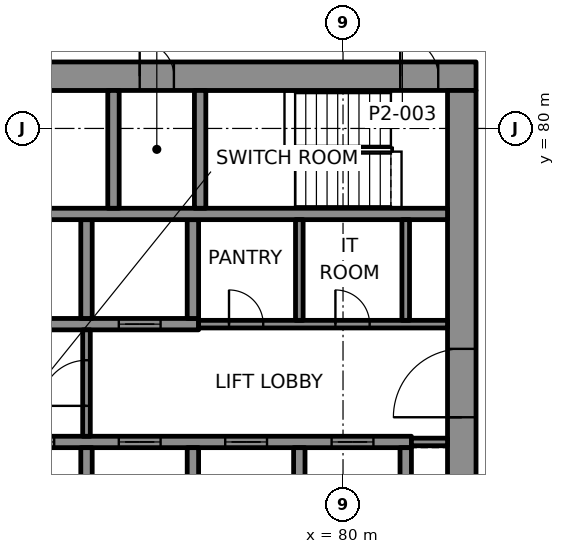
"""IFC4 building model, lengths in metres.
Left out: names, types, materials, properties, quantities, classifications, styles, units other than length and angle.
Written with IfcOpenShell. Run it as: python <this file> out.ifc"""

import sys

from ifc_helpers import new_model, si_unit, direction, frame, frame_2d, origin, place, context, subcontext, project, spatial, rectangle, extrude, element, fill, save


model = new_model("IFC4")
c1 = context("Model", 3, precision=1e-05, world=origin(), true_north=direction((0.0, 1.0)))
c2 = subcontext(c1, "Body", "Model", "MODEL_VIEW")
j1 = project(units=[si_unit("LENGTHUNIT", "METRE"), si_unit("PLANEANGLEUNIT", "RADIAN")], contexts=[c1])
p1 = place(None, origin())
s1 = spatial("IfcSite", under=j1, at=p1, CompositionType="ELEMENT")
p2 = place(p1, origin())
s2 = spatial("IfcBuilding", under=s1, at=p2, CompositionType="ELEMENT")
p3 = place(p2, frame((0.0, 0.0, 302.1)))
s3 = spatial("IfcBuildingStorey", under=s2, at=p3, CompositionType="ELEMENT", Elevation=302.1)
p4 = place(p3, frame((66.5, 81.375, 0.0), z_axis=(0.0, 0.0, 1.0), x_axis=(1.0, 0.0, 0.0)))
e1 = element("IfcWall", 1, at=p4, inside=s3, PredefinedType="SHEAR", context=c2, shape_type="SweptSolid", body=[
    extrude(rectangle(XDim=17.0, YDim=0.75, at=frame_2d((8.5, 0.0))), origin(), (0.0, 0.0, 1.0), 3.3),
])
p5 = place(p4, frame((1.195, 0.0, 0.0)))
e2 = element("IfcOpeningElement", 2, at=p5, cuts=e1, PredefinedType="OPENING", context=c2, shape_type="SweptSolid", body=[
    extrude(rectangle(XDim=1.0, YDim=2.1, at=frame_2d((0.5, 1.05))), frame((0.0, 0.385, 0.0), z_axis=(0.0, -1.0, 0.0), x_axis=(1.0, 0.0, 0.0)), (0.0, 0.0, 1.0), 0.77),
])
p6 = place(p4, frame((15.005, 0.0, 0.0)))
e3 = element("IfcOpeningElement", 3, at=p6, cuts=e1, PredefinedType="OPENING", context=c2, shape_type="SweptSolid", body=[
    extrude(rectangle(XDim=1.0, YDim=2.1, at=frame_2d((0.5, 1.05))), frame((0.0, 0.385, 0.0), z_axis=(0.0, -1.0, 0.0), x_axis=(1.0, 0.0, 0.0)), (0.0, 0.0, 1.0), 0.77),
])
p7 = place(p4, frame((8.15, 0.0, 0.0)))
e4 = element("IfcOpeningElement", 4, at=p7, cuts=e1, PredefinedType="OPENING", context=c2, shape_type="SweptSolid", body=[
    extrude(rectangle(XDim=0.9, YDim=2.1, at=frame_2d((0.45, 1.05))), frame((0.0, 0.385, 0.0), z_axis=(0.0, -1.0, 0.0), x_axis=(1.0, 0.0, 0.0)), (0.0, 0.0, 1.0), 0.77),
])
p8 = place(p3, frame((83.125, 69.0, 0.0), z_axis=(0.0, 0.0, 1.0), x_axis=(0.0, 1.0, 0.0)))
e5 = element("IfcWall", 5, at=p8, inside=s3, PredefinedType="SHEAR", context=c2, shape_type="SweptSolid", body=[
    extrude(rectangle(XDim=12.0, YDim=0.75, at=frame_2d((6.0, 0.0))), origin(), (0.0, 0.0, 1.0), 3.3),
])
p9 = place(p8, frame((3.4, 0.0, 0.0)))
e6 = element("IfcOpeningElement", 6, at=p9, cuts=e5, PredefinedType="OPENING", context=c2, shape_type="SweptSolid", body=[
    extrude(rectangle(XDim=1.8, YDim=2.1, at=frame_2d((0.9, 1.05))), frame((0.0, 0.385, 0.0), z_axis=(0.0, -1.0, 0.0), x_axis=(1.0, 0.0, 0.0)), (0.0, 0.0, 1.0), 0.77),
])
p10 = place(p3, frame((70.3, 71.75, 0.0), z_axis=(0.0, 0.0, 1.0), x_axis=(1.0, 0.0, 0.0)))
e7 = element("IfcWall", 7, at=p10, inside=s3, PredefinedType="SHEAR", context=c2, shape_type="SweptSolid", body=[
    extrude(rectangle(XDim=11.5, YDim=0.3, at=frame_2d((5.75, 0.0))), origin(), (0.0, 0.0, 1.0), 3.3),
])
p11 = place(p10, frame((1.0, 0.0, 0.0)))
e8 = element("IfcOpeningElement", 8, at=p11, cuts=e7, PredefinedType="OPENING", context=c2, shape_type="SweptSolid", body=[
    extrude(rectangle(XDim=1.1, YDim=2.1, at=frame_2d((0.55, 1.05))), frame((0.0, 0.16, 0.0), z_axis=(0.0, -1.0, 0.0), x_axis=(1.0, 0.0, 0.0)), (0.0, 0.0, 1.0), 0.32),
])
p12 = place(p10, frame((3.8, 0.0, 0.0)))
e9 = element("IfcOpeningElement", 9, at=p12, cuts=e7, PredefinedType="OPENING", context=c2, shape_type="SweptSolid", body=[
    extrude(rectangle(XDim=1.1, YDim=2.1, at=frame_2d((0.55, 1.05))), frame((0.0, 0.16, 0.0), z_axis=(0.0, -1.0, 0.0), x_axis=(1.0, 0.0, 0.0)), (0.0, 0.0, 1.0), 0.32),
])
p13 = place(p10, frame((6.6, 0.0, 0.0)))
e10 = element("IfcOpeningElement", 10, at=p13, cuts=e7, PredefinedType="OPENING", context=c2, shape_type="SweptSolid", body=[
    extrude(rectangle(XDim=1.1, YDim=2.1, at=frame_2d((0.55, 1.05))), frame((0.0, 0.16, 0.0), z_axis=(0.0, -1.0, 0.0), x_axis=(1.0, 0.0, 0.0)), (0.0, 0.0, 1.0), 0.32),
])
p14 = place(p10, frame((9.4, 0.0, 0.0)))
e11 = element("IfcOpeningElement", 11, at=p14, cuts=e7, PredefinedType="OPENING", context=c2, shape_type="SweptSolid", body=[
    extrude(rectangle(XDim=1.1, YDim=2.1, at=frame_2d((0.55, 1.05))), frame((0.0, 0.16, 0.0), z_axis=(0.0, -1.0, 0.0), x_axis=(1.0, 0.0, 0.0)), (0.0, 0.0, 1.0), 0.32),
])
p15 = place(p3, frame((70.3, 74.85, 0.0), z_axis=(0.0, 0.0, 1.0), x_axis=(1.0, 0.0, 0.0)))
e12 = element("IfcWall", 12, at=p15, inside=s3, PredefinedType="SHEAR", context=c2, shape_type="SweptSolid", body=[
    extrude(rectangle(XDim=5.9, YDim=0.3, at=frame_2d((2.95, 0.0))), origin(), (0.0, 0.0, 1.0), 3.3),
])
p16 = place(p15, frame((3.8, 0.0, 0.0)))
e13 = element("IfcOpeningElement", 13, at=p16, cuts=e12, PredefinedType="OPENING", context=c2, shape_type="SweptSolid", body=[
    extrude(rectangle(XDim=1.1, YDim=2.1, at=frame_2d((0.55, 1.05))), frame((0.0, 0.16, 0.0), z_axis=(0.0, -1.0, 0.0), x_axis=(1.0, 0.0, 0.0)), (0.0, 0.0, 1.0), 0.32),
])
for number, where, z_axis, x_axis in (
    (14, (73.25, 69.0, 0.0), (0.0, 0.0, 1.0), (0.0, 1.0, 0.0)),
    (15, (73.25, 75.0, 0.0), (0.0, 0.0, 1.0), (0.0, 1.0, 0.0)),
    (16, (76.05, 69.0, 0.0), (0.0, 0.0, 1.0), (0.0, 1.0, 0.0)),
    (17, (76.05, 75.0, 0.0), (0.0, 0.0, 1.0), (0.0, 1.0, 0.0)),
    (18, (78.85, 69.0, 0.0), (0.0, 0.0, 1.0), (0.0, 1.0, 0.0)),
    (19, (81.65, 69.0, 0.0), (0.0, 0.0, 1.0), (0.0, 1.0, 0.0)),
):
    element("IfcWall", number, at=place(p3, frame(where, z_axis=z_axis, x_axis=x_axis)), inside=s3, PredefinedType="SHEAR", context=c2, shape_type="SweptSolid", body=[
        extrude(rectangle(XDim=2.6, YDim=0.3, at=frame_2d((1.3, 0.0))), origin(), (0.0, 0.0, 1.0), 3.3),
    ])
p17 = place(p3, frame((67.25, 77.75, 0.0), z_axis=(0.0, 0.0, 1.0), x_axis=(1.0, 0.0, 0.0)))
e20 = element("IfcWall", 20, at=p17, inside=s3, PredefinedType="SHEAR", context=c2, shape_type="SweptSolid", body=[
    extrude(rectangle(XDim=15.5, YDim=0.3, at=frame_2d((7.75, 0.0))), origin(), (0.0, 0.0, 1.0), 3.3),
])
p18 = place(p17, frame((0.445, 0.0, 0.0)))
e21 = element("IfcOpeningElement", 21, at=p18, cuts=e20, PredefinedType="OPENING", context=c2, shape_type="SweptSolid", body=[
    extrude(rectangle(XDim=1.0, YDim=2.1, at=frame_2d((0.5, 1.05))), frame((0.0, 0.16, 0.0), z_axis=(0.0, -1.0, 0.0), x_axis=(1.0, 0.0, 0.0)), (0.0, 0.0, 1.0), 0.32),
])
for number, where, z_axis, x_axis in (
    (22, (73.96, 77.9, 0.0), (0.0, 0.0, 1.0), (0.0, 1.0, 0.0)),
    (23, (76.24, 77.9, 0.0), (0.0, 0.0, 1.0), (0.0, 1.0, 0.0)),
):
    element("IfcWall", number, at=place(p3, frame(where, z_axis=z_axis, x_axis=x_axis)), inside=s3, PredefinedType="SHEAR", context=c2, shape_type="SweptSolid", body=[
        extrude(rectangle(XDim=3.1, YDim=0.3, at=frame_2d((1.55, 0.0))), origin(), (0.0, 0.0, 1.0), 3.3),
    ])
p19 = place(p3, frame((81.8, 71.75, 0.0), z_axis=(0.0, 0.0, 1.0), x_axis=(1.0, 0.0, 0.0)))
e24 = element("IfcWall", 24, at=p19, inside=s3, PredefinedType="PARTITIONING", context=c2, shape_type="SweptSolid", body=[
    extrude(rectangle(XDim=0.95, YDim=0.2, at=frame_2d((0.475, 0.0))), origin(), (0.0, 0.0, 1.0), 3.3),
])
p20 = place(p3, frame((76.2, 74.85, 0.0), z_axis=(0.0, 0.0, 1.0), x_axis=(1.0, 0.0, 0.0)))
e25 = element("IfcWall", 25, at=p20, inside=s3, PredefinedType="PARTITIONING", context=c2, shape_type="SweptSolid", body=[
    extrude(rectangle(XDim=6.55, YDim=0.2, at=frame_2d((3.275, 0.0))), origin(), (0.0, 0.0, 1.0), 3.3),
])
p21 = place(p20, frame((0.8, 0.0, 0.0)))
e26 = element("IfcOpeningElement", 26, at=p21, cuts=e25, PredefinedType="OPENING", context=c2, shape_type="SweptSolid", body=[
    extrude(rectangle(XDim=0.9, YDim=2.1, at=frame_2d((0.45, 1.05))), frame((0.0, 0.11, 0.0), z_axis=(0.0, -1.0, 0.0), x_axis=(1.0, 0.0, 0.0)), (0.0, 0.0, 1.0), 0.22),
])
p22 = place(p20, frame((3.6, 0.0, 0.0)))
e27 = element("IfcOpeningElement", 27, at=p22, cuts=e25, PredefinedType="OPENING", context=c2, shape_type="SweptSolid", body=[
    extrude(rectangle(XDim=0.9, YDim=2.1, at=frame_2d((0.45, 1.05))), frame((0.0, 0.11, 0.0), z_axis=(0.0, -1.0, 0.0), x_axis=(1.0, 0.0, 0.0)), (0.0, 0.0, 1.0), 0.22),
])
p23 = place(p3, frame((73.25, 71.9, 0.0), z_axis=(0.0, 0.0, 1.0), x_axis=(0.0, 1.0, 0.0)))
e28 = element("IfcWall", 28, at=p23, inside=s3, PredefinedType="PARTITIONING", context=c2, shape_type="SweptSolid", body=[
    extrude(rectangle(XDim=2.8, YDim=0.2, at=frame_2d((1.4, 0.0))), origin(), (0.0, 0.0, 1.0), 3.3),
])
p24 = place(p23, frame((0.8, 0.0, 0.0)))
e29 = element("IfcOpeningElement", 29, at=p24, cuts=e28, PredefinedType="OPENING", context=c2, shape_type="SweptSolid", body=[
    extrude(rectangle(XDim=1.2, YDim=2.1, at=frame_2d((0.6, 1.05))), frame((0.0, 0.11, 0.0), z_axis=(0.0, -1.0, 0.0), x_axis=(1.0, 0.0, 0.0)), (0.0, 0.0, 1.0), 0.22),
])
for number, where, z_axis, x_axis in (
    (30, (78.85, 74.95, 0.0), (0.0, 0.0, 1.0), (0.0, 1.0, 0.0)),
    (31, (81.65, 74.95, 0.0), (0.0, 0.0, 1.0), (0.0, 1.0, 0.0)),
):
    element("IfcWall", number, at=place(p3, frame(where, z_axis=z_axis, x_axis=x_axis)), inside=s3, PredefinedType="PARTITIONING", context=c2, shape_type="SweptSolid", body=[
        extrude(rectangle(XDim=2.65, YDim=0.2, at=frame_2d((1.325, 0.0))), origin(), (0.0, 0.0, 1.0), 3.3),
    ])
p25 = place(p11, origin())
e32 = element("IfcDoor", 32, at=p25, inside=s3, OperationType="DOUBLE_DOOR_SLIDING", PredefinedType="DOOR", context=c2, shape_type="SweptSolid", body=[
    extrude(rectangle(XDim=1.1, YDim=2.1, at=frame_2d((0.55, 1.05))), frame((0.0, 0.025, 0.0), z_axis=(0.0, -1.0, 0.0), x_axis=(1.0, 0.0, 0.0)), (0.0, 0.0, 1.0), 0.05),
])
fill(e8, e32)
p26 = place(p12, origin())
e33 = element("IfcDoor", 33, at=p26, inside=s3, OperationType="DOUBLE_DOOR_SLIDING", PredefinedType="DOOR", context=c2, shape_type="SweptSolid", body=[
    extrude(rectangle(XDim=1.1, YDim=2.1, at=frame_2d((0.55, 1.05))), frame((0.0, 0.025, 0.0), z_axis=(0.0, -1.0, 0.0), x_axis=(1.0, 0.0, 0.0)), (0.0, 0.0, 1.0), 0.05),
])
fill(e9, e33)
p27 = place(p13, origin())
e34 = element("IfcDoor", 34, at=p27, inside=s3, OperationType="DOUBLE_DOOR_SLIDING", PredefinedType="DOOR", context=c2, shape_type="SweptSolid", body=[
    extrude(rectangle(XDim=1.1, YDim=2.1, at=frame_2d((0.55, 1.05))), frame((0.0, 0.025, 0.0), z_axis=(0.0, -1.0, 0.0), x_axis=(1.0, 0.0, 0.0)), (0.0, 0.0, 1.0), 0.05),
])
fill(e10, e34)
p28 = place(p14, origin())
e35 = element("IfcDoor", 35, at=p28, inside=s3, OperationType="DOUBLE_DOOR_SLIDING", PredefinedType="DOOR", context=c2, shape_type="SweptSolid", body=[
    extrude(rectangle(XDim=1.1, YDim=2.1, at=frame_2d((0.55, 1.05))), frame((0.0, 0.025, 0.0), z_axis=(0.0, -1.0, 0.0), x_axis=(1.0, 0.0, 0.0)), (0.0, 0.0, 1.0), 0.05),
])
fill(e11, e35)
p29 = place(p16, origin())
e36 = element("IfcDoor", 36, at=p29, inside=s3, OperationType="DOUBLE_DOOR_SLIDING", PredefinedType="DOOR", context=c2, shape_type="SweptSolid", body=[
    extrude(rectangle(XDim=1.1, YDim=2.1, at=frame_2d((0.55, 1.05))), frame((0.0, 0.025, 0.0), z_axis=(0.0, -1.0, 0.0), x_axis=(1.0, 0.0, 0.0)), (0.0, 0.0, 1.0), 0.05),
])
fill(e13, e36)
p30 = place(p6, origin())
e37 = element("IfcDoor", 37, at=p30, inside=s3, OperationType="SINGLE_SWING_LEFT", PredefinedType="DOOR", context=c2, shape_type="SweptSolid", body=[
    extrude(rectangle(XDim=1.0, YDim=2.1, at=frame_2d((0.5, 1.05))), frame((0.0, 0.095, 0.0), z_axis=(0.0, -1.0, 0.0), x_axis=(1.0, 0.0, 0.0)), (0.0, 0.0, 1.0), 0.19),
])
fill(e3, e37)
p31 = place(p24, origin())
e38 = element("IfcDoor", 38, at=p31, inside=s3, OperationType="SINGLE_SWING_LEFT", PredefinedType="DOOR", context=c2, shape_type="SweptSolid", body=[
    extrude(rectangle(XDim=1.2, YDim=2.1, at=frame_2d((0.6, 1.05))), frame((0.0, 0.025, 0.0), z_axis=(0.0, -1.0, 0.0), x_axis=(1.0, 0.0, 0.0)), (0.0, 0.0, 1.0), 0.05),
])
fill(e29, e38)
p32 = place(p9, origin())
e39 = element("IfcDoor", 39, at=p32, inside=s3, OperationType="SINGLE_SWING_LEFT", PredefinedType="DOOR", context=c2, shape_type="SweptSolid", body=[
    extrude(rectangle(XDim=1.8, YDim=2.1, at=frame_2d((0.9, 1.05))), frame((0.0, 0.095, 0.0), z_axis=(0.0, -1.0, 0.0), x_axis=(1.0, 0.0, 0.0)), (0.0, 0.0, 1.0), 0.19),
])
fill(e6, e39)
p33 = place(p21, origin())
e40 = element("IfcDoor", 40, at=p33, inside=s3, OperationType="SINGLE_SWING_RIGHT", PredefinedType="DOOR", context=c2, shape_type="SweptSolid", body=[
    extrude(rectangle(XDim=0.9, YDim=2.1, at=frame_2d((0.45, 1.05))), frame((0.0, 0.025, 0.0), z_axis=(0.0, -1.0, 0.0), x_axis=(1.0, 0.0, 0.0)), (0.0, 0.0, 1.0), 0.05),
])
fill(e26, e40)
p34 = place(p22, origin())
e41 = element("IfcDoor", 41, at=p34, inside=s3, OperationType="SINGLE_SWING_LEFT", PredefinedType="DOOR", context=c2, shape_type="SweptSolid", body=[
    extrude(rectangle(XDim=0.9, YDim=2.1, at=frame_2d((0.45, 1.05))), frame((0.0, 0.025, 0.0), z_axis=(0.0, -1.0, 0.0), x_axis=(1.0, 0.0, 0.0)), (0.0, 0.0, 1.0), 0.05),
])
fill(e27, e41)
p35 = place(p7, origin())
e42 = element("IfcDoor", 42, at=p35, inside=s3, OperationType="SINGLE_SWING_RIGHT", PredefinedType="DOOR", context=c2, shape_type="SweptSolid", body=[
    extrude(rectangle(XDim=0.9, YDim=2.1, at=frame_2d((0.45, 1.05))), frame((0.0, 0.095, 0.0), z_axis=(0.0, -1.0, 0.0), x_axis=(1.0, 0.0, 0.0)), (0.0, 0.0, 1.0), 0.19),
])
fill(e4, e42)
save(model, sys.argv[1])
